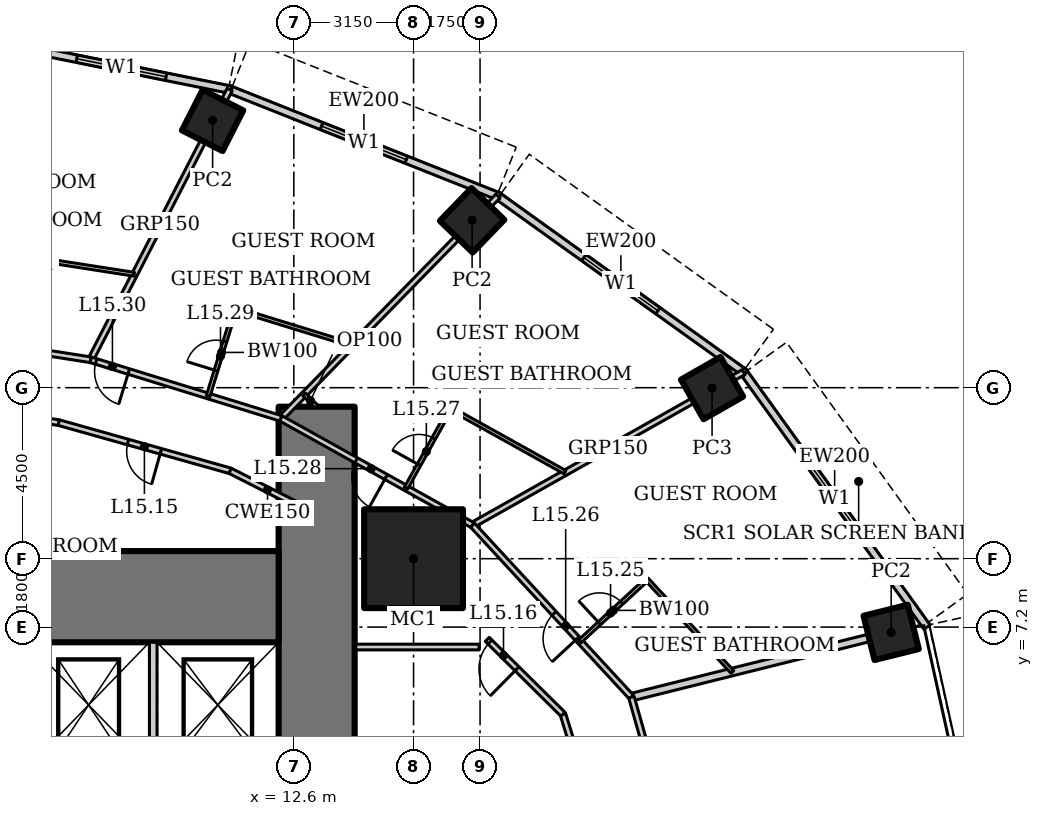
"""IFC4 building model, lengths in metres.
Left out: names, types, materials, properties, quantities, classifications, styles, units other than length and angle.
Written with IfcOpenShell. Run it as: python <this file> out.ifc"""

import sys

from ifc_helpers import new_model, si_unit, direction, frame, frame_2d, origin, origin_2d, place, context, subcontext, project, spatial, rectangle, hollow_rectangle, extrude, element, fill, save


model = new_model("IFC4")
c1 = context("Model", 3, precision=1e-05, world=origin(), true_north=direction((0.0, 1.0)))
c2 = subcontext(c1, "Body", "Model", "MODEL_VIEW")
j1 = project(units=[si_unit("LENGTHUNIT", "METRE"), si_unit("PLANEANGLEUNIT", "RADIAN")], contexts=[c1])
p1 = place(None, origin())
s1 = spatial("IfcSite", under=j1, at=p1, CompositionType="ELEMENT")
p2 = place(p1, origin())
s2 = spatial("IfcBuilding", under=s1, at=p2, CompositionType="ELEMENT")
p3 = place(p2, frame((0.0, 0.0, 69.4)))
s3 = spatial("IfcBuildingStorey", under=s2, at=p3, CompositionType="ELEMENT", Elevation=69.4)
p4 = place(p3, frame((15.75, 9.0, 0.0), z_axis=(0.0, 0.0, 1.0), x_axis=(1.0, 0.0, 0.0)))
e1 = element("IfcColumn", 1, at=p4, inside=s3, PredefinedType="COLUMN", context=c2, shape_type="SweptSolid", body=[
    extrude(hollow_rectangle(XDim=2.6, YDim=2.6, WallThickness=0.13, at=origin_2d()), origin(), (0.0, 0.0, 1.0), 3.6),
])
p5 = place(p3, frame((28.318, 7.06, 0.0), z_axis=(0.0, 0.0, 1.0), x_axis=(0.970295726276, 0.2419218956, 0.0)))
e2 = element("IfcColumn", 2, at=p5, inside=s3, PredefinedType="COLUMN", context=c2, shape_type="SweptSolid", body=[
    extrude(hollow_rectangle(XDim=1.2, YDim=1.2, WallThickness=0.1, at=origin_2d()), origin(), (0.0, 0.0, 1.0), 3.6),
])
p6 = place(p3, frame((23.605, 13.489, 0.0), z_axis=(0.0, 0.0, 1.0), x_axis=(0.86824298017, 0.496139221777, 0.0)))
e3 = element("IfcColumn", 3, at=p6, inside=s3, PredefinedType="COLUMN", context=c2, shape_type="SweptSolid", body=[
    extrude(hollow_rectangle(XDim=1.2, YDim=1.2, WallThickness=0.12, at=origin_2d()), origin(), (0.0, 0.0, 1.0), 3.6),
])
for number, where, z_axis, x_axis in (
    (4, (17.291, 17.905, 0.0), (0.0, 0.0, 1.0), (0.695, 0.719, 0.0)),
    (5, (10.463, 20.534, 0.0), (0.0, 0.0, 1.0), (0.454, 0.891, 0.0)),
):
    element("IfcColumn", number, at=place(p3, frame(where, z_axis=z_axis, x_axis=x_axis)), inside=s3, PredefinedType="COLUMN", context=c2, shape_type="SweptSolid", body=[
        extrude(hollow_rectangle(XDim=1.2, YDim=1.2, WallThickness=0.1, at=origin_2d()), origin(), (0.0, 0.0, 1.0), 3.6),
    ])
p7 = place(p3, frame((13.2, -13.0, 0.0), z_axis=(0.0, 0.0, 1.0), x_axis=(0.0, 1.0, 0.0)))
e6 = element("IfcWall", 6, at=p7, inside=s3, PredefinedType="SHEAR", context=c2, shape_type="SweptSolid", body=[
    extrude(rectangle(XDim=26.0, YDim=2.0, at=frame_2d((13.0, 0.0))), origin(), (0.0, 0.0, 1.0), 3.6),
])
p8 = place(p7, frame((12.1, 0.0, 0.0)))
e7 = element("IfcOpeningElement", 7, at=p8, cuts=e6, PredefinedType="OPENING", context=c2, shape_type="SweptSolid", body=[
    extrude(rectangle(XDim=1.8, YDim=2.1, at=frame_2d((0.9, 1.05))), frame((0.0, 1.01, 0.0), z_axis=(0.0, -1.0, 0.0), x_axis=(1.0, 0.0, 0.0)), (0.0, 0.0, 1.0), 2.02),
])
p9 = place(p3, frame((12.2, 8.0, 0.0), z_axis=(0.0, 0.0, 1.0), x_axis=(-1.0, 0.0, 0.0)))
e8 = element("IfcWall", 8, at=p9, inside=s3, PredefinedType="SHEAR", context=c2, shape_type="SweptSolid", body=[
    extrude(rectangle(XDim=24.4, YDim=2.4, at=frame_2d((12.2, 0.0))), origin(), (0.0, 0.0, 1.0), 3.6),
])
p10 = place(p3, frame((8.9, 3.5, 0.0), z_axis=(0.0, 0.0, 1.0), x_axis=(0.0, 1.0, 0.0)))
e9 = element("IfcWall", 9, at=p10, inside=s3, PredefinedType="SOLIDWALL", context=c2, shape_type="SweptSolid", body=[
    extrude(rectangle(XDim=3.3, YDim=0.2, at=frame_2d((1.65, 0.0))), origin(), (0.0, 0.0, 1.0), 3.6),
])
p11 = place(p3, frame((29.26, 7.2, 0.0), z_axis=(0.0, 0.0, 1.0), x_axis=(-0.583937613703, 0.811798536155, 0.0)))
e10 = element("IfcWall", 10, at=p11, inside=s3, PredefinedType="SOLIDWALL", context=c2, shape_type="SweptSolid", body=[
    extrude(rectangle(XDim=8.323, YDim=0.2, at=frame_2d((4.162, 0.0))), origin(), (0.0, 0.0, 1.0), 3.45),
])
p12 = place(p11, frame((2.961, 0.0, 0.5)))
e11 = element("IfcOpeningElement", 11, at=p12, cuts=e10, PredefinedType="OPENING", context=c2, shape_type="SweptSolid", body=[
    extrude(rectangle(XDim=2.4, YDim=2.2, at=frame_2d((1.2, 1.1))), frame((0.0, 0.11, 0.0), z_axis=(0.0, -1.0, 0.0), x_axis=(1.0, 0.0, 0.0)), (0.0, 0.0, 1.0), 0.22),
])
p13 = place(p3, frame((24.482, 13.875, 0.0), z_axis=(0.0, 0.0, 1.0), x_axis=(-0.812791321576, 0.582554948112, 0.0)))
e12 = element("IfcWall", 12, at=p13, inside=s3, PredefinedType="SOLIDWALL", context=c2, shape_type="SweptSolid", body=[
    extrude(rectangle(XDim=8.063, YDim=0.2, at=frame_2d((4.032, 0.0))), origin(), (0.0, 0.0, 1.0), 3.45),
])
p14 = place(p13, frame((2.832, 0.0, 0.5)))
e13 = element("IfcOpeningElement", 13, at=p14, cuts=e12, PredefinedType="OPENING", context=c2, shape_type="SweptSolid", body=[
    extrude(rectangle(XDim=2.4, YDim=2.2, at=frame_2d((1.2, 1.1))), frame((0.0, 0.11, 0.0), z_axis=(0.0, -1.0, 0.0), x_axis=(1.0, 0.0, 0.0)), (0.0, 0.0, 1.0), 0.22),
])
p15 = place(p3, frame((18.018, 18.523, 0.0), z_axis=(0.0, 0.0, 1.0), x_axis=(-0.929358351251, 0.369178892895, 0.0)))
e14 = element("IfcWall", 14, at=p15, inside=s3, PredefinedType="SOLIDWALL", context=c2, shape_type="SweptSolid", body=[
    extrude(rectangle(XDim=7.692, YDim=0.2, at=frame_2d((3.846, 0.0))), origin(), (0.0, 0.0, 1.0), 3.45),
])
p16 = place(p15, frame((2.646, 0.0, 0.5)))
e15 = element("IfcOpeningElement", 15, at=p16, cuts=e14, PredefinedType="OPENING", context=c2, shape_type="SweptSolid", body=[
    extrude(rectangle(XDim=2.4, YDim=2.2, at=frame_2d((1.2, 1.1))), frame((0.0, 0.11, 0.0), z_axis=(0.0, -1.0, 0.0), x_axis=(1.0, 0.0, 0.0)), (0.0, 0.0, 1.0), 0.22),
])
p17 = place(p3, frame((10.957, 21.337, 0.0), z_axis=(0.0, 0.0, 1.0), x_axis=(-0.980251657452, 0.197754110105, 0.0)))
e16 = element("IfcWall", 16, at=p17, inside=s3, PredefinedType="SOLIDWALL", context=c2, shape_type="SweptSolid", body=[
    extrude(rectangle(XDim=5.904, YDim=0.2, at=frame_2d((2.952, 0.0))), origin(), (0.0, 0.0, 1.0), 3.45),
])
p18 = place(p17, frame((1.752, 0.0, 0.5)))
e17 = element("IfcOpeningElement", 17, at=p18, cuts=e16, PredefinedType="OPENING", context=c2, shape_type="SweptSolid", body=[
    extrude(rectangle(XDim=2.4, YDim=2.2, at=frame_2d((1.2, 1.1))), frame((0.0, 0.11, 0.0), z_axis=(0.0, -1.0, 0.0), x_axis=(1.0, 0.0, 0.0)), (0.0, 0.0, 1.0), 0.22),
])
p19 = place(p3, frame((27.833, 6.939, 0.0), z_axis=(0.0, 0.0, 1.0), x_axis=(-0.970295936837, -0.241921051083, 0.0)))
e18 = element("IfcWall", 18, at=p19, inside=s3, PredefinedType="SOLIDWALL", context=c2, shape_type="SweptSolid", body=[
    extrude(rectangle(XDim=6.543, YDim=0.2, at=frame_2d((3.272, 0.0))), origin(), (0.0, 0.0, 1.0), 2.333),
])
p20 = place(p3, frame((24.435, 13.909, 0.0), z_axis=(0.0, 0.0, 1.0), x_axis=(-0.871075246657, -0.491149584813, 0.0)))
e19 = element("IfcWall", 19, at=p20, inside=s3, PredefinedType="PARTITIONING", context=c2, shape_type="SweptSolid", body=[
    extrude(rectangle(XDim=8.192, YDim=0.15, at=frame_2d((4.096, 0.0))), origin(), (0.0, 0.0, 1.0), 2.693),
])
p21 = place(p3, frame((17.97, 18.542, 0.0), z_axis=(0.0, 0.0, 1.0), x_axis=(-0.698757291878, -0.715358823981, 0.0)))
e20 = element("IfcWall", 20, at=p21, inside=s3, PredefinedType="PARTITIONING", context=c2, shape_type="SweptSolid", body=[
    extrude(rectangle(XDim=8.177, YDim=0.15, at=frame_2d((4.088, 0.0))), origin(), (0.0, 0.0, 1.0), 2.528),
])
p22 = place(p3, frame((10.912, 21.346, 0.0), z_axis=(0.0, 0.0, 1.0), x_axis=(-0.45752665959, -0.889195904042, 0.0)))
e21 = element("IfcWall", 21, at=p22, inside=s3, PredefinedType="PARTITIONING", context=c2, shape_type="SweptSolid", body=[
    extrude(rectangle(XDim=7.997, YDim=0.15, at=frame_2d((3.999, 0.0))), origin(), (0.0, 0.0, 1.0), 2.528),
])
p23 = place(p3, frame((21.484, 5.356, 0.0), z_axis=(0.0, 0.0, 1.0), x_axis=(-0.678641806296, 0.734469399463, 0.0)))
e22 = element("IfcWall", 22, at=p23, inside=s3, PredefinedType="PARTITIONING", context=c2, shape_type="SweptSolid", body=[
    extrude(rectangle(XDim=6.166, YDim=0.15, at=frame_2d((3.083, 0.0))), origin(), (0.0, 0.0, 1.0), 3.45),
])
p24 = place(p23, frame((2.1, 0.0, 0.0)))
e23 = element("IfcOpeningElement", 23, at=p24, cuts=e22, PredefinedType="OPENING", context=c2, shape_type="SweptSolid", body=[
    extrude(rectangle(XDim=0.9, YDim=2.1, at=frame_2d((0.45, 1.05))), frame((0.0, 0.085, 0.0), z_axis=(0.0, -1.0, 0.0), x_axis=(1.0, 0.0, 0.0)), (0.0, 0.0, 1.0), 0.17),
])
p25 = place(p3, frame((17.299, 9.885, 0.0), z_axis=(0.0, 0.0, 1.0), x_axis=(-0.873695910579, 0.486472461541, 0.0)))
e24 = element("IfcWall", 24, at=p25, inside=s3, PredefinedType="PARTITIONING", context=c2, shape_type="SweptSolid", body=[
    extrude(rectangle(XDim=5.771, YDim=0.15, at=frame_2d((2.885, 0.0))), origin(), (0.0, 0.0, 1.0), 3.45),
])
p26 = place(p25, frame((2.6, 0.0, 0.0)))
e25 = element("IfcOpeningElement", 25, at=p26, cuts=e24, PredefinedType="OPENING", context=c2, shape_type="SweptSolid", body=[
    extrude(rectangle(XDim=0.9, YDim=2.1, at=frame_2d((0.45, 1.05))), frame((0.0, 0.085, 0.0), z_axis=(0.0, -1.0, 0.0), x_axis=(1.0, 0.0, 0.0)), (0.0, 0.0, 1.0), 0.17),
])
p27 = place(p3, frame((12.257, 12.693, 0.0), z_axis=(0.0, 0.0, 1.0), x_axis=(-0.955657956744, 0.294478980085, 0.0)))
e26 = element("IfcWall", 26, at=p27, inside=s3, PredefinedType="PARTITIONING", context=c2, shape_type="SweptSolid", body=[
    extrude(rectangle(XDim=5.236, YDim=0.15, at=frame_2d((2.618, 0.0))), origin(), (0.0, 0.0, 1.0), 3.45),
])
p28 = place(p27, frame((4.186, 0.0, 0.0)))
e27 = element("IfcOpeningElement", 27, at=p28, cuts=e26, PredefinedType="OPENING", context=c2, shape_type="SweptSolid", body=[
    extrude(rectangle(XDim=0.9, YDim=2.1, at=frame_2d((0.45, 1.05))), frame((0.0, 0.085, 0.0), z_axis=(0.0, -1.0, 0.0), x_axis=(1.0, 0.0, 0.0)), (0.0, 0.0, 1.0), 0.17),
])
p29 = place(p3, frame((7.253, 14.235, 0.0), z_axis=(0.0, 0.0, 1.0), x_axis=(-0.988015036573, 0.154357660987, 0.0)))
e28 = element("IfcWall", 28, at=p29, inside=s3, PredefinedType="PARTITIONING", context=c2, shape_type="SweptSolid", body=[
    extrude(rectangle(XDim=3.875, YDim=0.15, at=frame_2d((1.938, 0.0))), origin(), (0.0, 0.0, 1.0), 3.45),
])
p30 = place(p29, frame((2.1, 0.0, 0.0)))
e29 = element("IfcOpeningElement", 29, at=p30, cuts=e28, PredefinedType="OPENING", context=c2, shape_type="SweptSolid", body=[
    extrude(rectangle(XDim=0.9, YDim=2.1, at=frame_2d((0.45, 1.05))), frame((0.0, 0.085, 0.0), z_axis=(0.0, -1.0, 0.0), x_axis=(1.0, 0.0, 0.0)), (0.0, 0.0, 1.0), 0.17),
])
p31 = place(p3, frame((20.921, 0.9, 0.0), z_axis=(0.0, 0.0, 1.0), x_axis=(-0.295778570807, 0.955256529447, 0.0)))
e30 = element("IfcWall", 30, at=p31, inside=s3, PredefinedType="PARTITIONING", context=c2, shape_type="SweptSolid", body=[
    extrude(rectangle(XDim=4.195, YDim=0.15, at=frame_2d((2.097, 0.0))), origin(), (0.0, 0.0, 1.0), 3.45),
])
p32 = place(p3, frame((10.924, 11.312, 0.0), z_axis=(0.0, 0.0, 1.0), x_axis=(-0.962643729928, 0.270771211967, 0.0)))
e31 = element("IfcWall", 31, at=p32, inside=s3, PredefinedType="PARTITIONING", context=c2, shape_type="SweptSolid", body=[
    extrude(rectangle(XDim=4.688, YDim=0.15, at=frame_2d((2.344, 0.0))), origin(), (0.0, 0.0, 1.0), 3.45),
])
p33 = place(p32, frame((1.894, 0.0, 0.0)))
e32 = element("IfcOpeningElement", 32, at=p33, cuts=e31, PredefinedType="OPENING", context=c2, shape_type="SweptSolid", body=[
    extrude(rectangle(XDim=0.9, YDim=2.1, at=frame_2d((0.45, 1.05))), frame((0.0, 0.085, 0.0), z_axis=(0.0, -1.0, 0.0), x_axis=(1.0, 0.0, 0.0)), (0.0, 0.0, 1.0), 0.17),
])
p34 = place(p3, frame((6.411, 12.582, 0.0), z_axis=(0.0, 0.0, 1.0), x_axis=(-0.990002114939, 0.14105251652, 0.0)))
e33 = element("IfcWall", 33, at=p34, inside=s3, PredefinedType="PARTITIONING", context=c2, shape_type="SweptSolid", body=[
    extrude(rectangle(XDim=3.429, YDim=0.15, at=frame_2d((1.714, 0.0))), origin(), (0.0, 0.0, 1.0), 3.45),
])
p35 = place(p3, frame((20.126, 6.825, 0.0), z_axis=(0.0, 0.0, 1.0), x_axis=(0.73447964986, 0.678630712495, 0.0)))
e34 = element("IfcWall", 34, at=p35, inside=s3, PredefinedType="PARTITIONING", context=c2, shape_type="SweptSolid", body=[
    extrude(rectangle(XDim=2.4, YDim=0.1, at=frame_2d((1.2, 0.0))), origin(), (0.0, 0.0, 1.0), 3.45),
])
p36 = place(p35, frame((0.7, 0.0, 0.0)))
e35 = element("IfcOpeningElement", 35, at=p36, cuts=e34, PredefinedType="OPENING", context=c2, shape_type="SweptSolid", body=[
    extrude(rectangle(XDim=0.8, YDim=2.1, at=frame_2d((0.4, 1.05))), frame((0.0, 0.06, 0.0), z_axis=(0.0, -1.0, 0.0), x_axis=(1.0, 0.0, 0.0)), (0.0, 0.0, 1.0), 0.12),
])
p37 = place(p3, frame((21.889, 8.454, 0.0), z_axis=(0.0, 0.0, 1.0), x_axis=(0.678653067823, -0.734458993773, 0.0)))
e36 = element("IfcWall", 36, at=p37, inside=s3, PredefinedType="PARTITIONING", context=c2, shape_type="SweptSolid", body=[
    extrude(rectangle(XDim=3.316, YDim=0.1, at=frame_2d((1.658, 0.0))), origin(), (0.0, 0.0, 1.0), 3.45),
])
p38 = place(p3, frame((15.552, 10.858, 0.0), z_axis=(0.0, 0.0, 1.0), x_axis=(0.486445964861, 0.873710663361, 0.0)))
e37 = element("IfcWall", 37, at=p38, inside=s3, PredefinedType="PARTITIONING", context=c2, shape_type="SweptSolid", body=[
    extrude(rectangle(XDim=2.4, YDim=0.1, at=frame_2d((1.2, 0.0))), origin(), (0.0, 0.0, 1.0), 3.45),
])
p39 = place(p38, frame((0.7, 0.0, 0.0)))
e38 = element("IfcOpeningElement", 38, at=p39, cuts=e37, PredefinedType="OPENING", context=c2, shape_type="SweptSolid", body=[
    extrude(rectangle(XDim=0.8, YDim=2.1, at=frame_2d((0.4, 1.05))), frame((0.0, 0.06, 0.0), z_axis=(0.0, -1.0, 0.0), x_axis=(1.0, 0.0, 0.0)), (0.0, 0.0, 1.0), 0.12),
])
p40 = place(p3, frame((16.719, 12.955, 0.0), z_axis=(0.0, 0.0, 1.0), x_axis=(0.873676251648, -0.486507766953, 0.0)))
e39 = element("IfcWall", 39, at=p40, inside=s3, PredefinedType="PARTITIONING", context=c2, shape_type="SweptSolid", body=[
    extrude(rectangle(XDim=3.45, YDim=0.1, at=frame_2d((1.725, 0.0))), origin(), (0.0, 0.0, 1.0), 3.45),
])
p41 = place(p3, frame((10.346, 13.281, 0.0), z_axis=(0.0, 0.0, 1.0), x_axis=(0.294478957423, 0.955657963727, 0.0)))
e40 = element("IfcWall", 40, at=p41, inside=s3, PredefinedType="PARTITIONING", context=c2, shape_type="SweptSolid", body=[
    extrude(rectangle(XDim=2.4, YDim=0.1, at=frame_2d((1.2, 0.0))), origin(), (0.0, 0.0, 1.0), 3.45),
])
p42 = place(p41, frame((0.7, 0.0, 0.0)))
e41 = element("IfcOpeningElement", 41, at=p42, cuts=e40, PredefinedType="OPENING", context=c2, shape_type="SweptSolid", body=[
    extrude(rectangle(XDim=0.8, YDim=2.1, at=frame_2d((0.4, 1.05))), frame((0.0, 0.06, 0.0), z_axis=(0.0, -1.0, 0.0), x_axis=(1.0, 0.0, 0.0)), (0.0, 0.0, 1.0), 0.12),
])
p43 = place(p3, frame((11.052, 15.575, 0.0), z_axis=(0.0, 0.0, 1.0), x_axis=(0.955641033268, -0.294533895391, 0.0)))
e42 = element("IfcWall", 42, at=p43, inside=s3, PredefinedType="PARTITIONING", context=c2, shape_type="SweptSolid", body=[
    extrude(rectangle(XDim=3.216, YDim=0.1, at=frame_2d((1.608, 0.0))), origin(), (0.0, 0.0, 1.0), 3.45),
])
p44 = place(p3, frame((5.647, 16.915, 0.0), z_axis=(0.0, 0.0, 1.0), x_axis=(0.988015375833, -0.154355489429, 0.0)))
e43 = element("IfcWall", 43, at=p44, inside=s3, PredefinedType="PARTITIONING", context=c2, shape_type="SweptSolid", body=[
    extrude(rectangle(XDim=2.785, YDim=0.1, at=frame_2d((1.393, 0.0))), origin(), (0.0, 0.0, 1.0), 3.45),
])
p45 = place(p3, frame((23.0, 0.0, 0.0), z_axis=(0.0, 0.0, 1.0), x_axis=(-0.272386051236, 0.962188047677, 0.0)))
e44 = element("IfcWall", 44, at=p45, inside=s3, PredefinedType="ELEMENTEDWALL", context=c2, shape_type="SweptSolid", body=[
    extrude(rectangle(XDim=5.567, YDim=0.15, at=frame_2d((2.783, 0.0))), origin(), (0.0, 0.0, 1.0), 3.45),
])
p46 = place(p45, frame((1.884, 0.0, 0.0)))
e45 = element("IfcOpeningElement", 45, at=p46, cuts=e44, PredefinedType="OPENING", context=c2, shape_type="SweptSolid", body=[
    extrude(rectangle(XDim=1.8, YDim=2.1, at=frame_2d((0.9, 1.05))), frame((0.0, 0.085, 0.0), z_axis=(0.0, -1.0, 0.0), x_axis=(1.0, 0.0, 0.0)), (0.0, 0.0, 1.0), 0.17),
])
p47 = place(p3, frame((13.2, 13.0, 0.0), z_axis=(0.0, 0.0, 1.0), x_axis=(-0.715289751842, 0.698827998087, 0.0)))
e46 = element("IfcWall", 46, at=p47, inside=s3, PredefinedType="PARTITIONING", context=c2, shape_type="SweptSolid", body=[
    extrude(rectangle(XDim=0.46, YDim=0.1, at=frame_2d((0.23, 0.0))), origin(), (0.0, 0.0, 1.0), 3.45),
])
p48 = place(p3, frame((19.681, 4.907, 0.0), z_axis=(0.0, 0.0, 1.0), x_axis=(-0.710845937688, 0.70334774676, 0.0)))
e47 = element("IfcWall", 47, at=p48, inside=s3, PredefinedType="PARTITIONING", context=c2, shape_type="SweptSolid", body=[
    extrude(rectangle(XDim=2.8, YDim=0.15, at=frame_2d((1.4, 0.0))), origin(), (0.0, 0.0, 1.0), 3.45),
])
p49 = place(p48, frame((1.7, 0.0, 0.0)))
e48 = element("IfcOpeningElement", 48, at=p49, cuts=e47, PredefinedType="OPENING", context=c2, shape_type="SweptSolid", body=[
    extrude(rectangle(XDim=1.0, YDim=2.1, at=frame_2d((0.5, 1.05))), frame((0.0, 0.085, 0.0), z_axis=(0.0, -1.0, 0.0), x_axis=(1.0, 0.0, 0.0)), (0.0, 0.0, 1.0), 0.17),
])
p50 = place(p3, frame((12.89, 10.313, 0.0), z_axis=(0.0, 0.0, 1.0), x_axis=(-0.891372999417, 0.453270532805, 0.0)))
e49 = element("IfcWall", 49, at=p50, inside=s3, PredefinedType="PARTITIONING", context=c2, shape_type="SweptSolid", body=[
    extrude(rectangle(XDim=2.205, YDim=0.15, at=frame_2d((1.103, 0.0))), origin(), (0.0, 0.0, 1.0), 3.45),
])
p51 = place(p3, frame((17.475, 6.675, 0.0), z_axis=(0.0, 0.0, 1.0), x_axis=(-1.0, 0.0, 0.0)))
e50 = element("IfcWall", 50, at=p51, inside=s3, PredefinedType="PARTITIONING", context=c2, shape_type="SweptSolid", body=[
    extrude(rectangle(XDim=3.245, YDim=0.15, at=frame_2d((1.622, 0.0))), origin(), (0.0, 0.0, 1.0), 3.45),
])
p52 = place(p12, origin())
e51 = element("IfcWindow", 51, at=p52, inside=s3, PartitioningType="SINGLE_PANEL", PredefinedType="WINDOW", context=c2, shape_type="SweptSolid", body=[
    extrude(rectangle(XDim=2.4, YDim=2.2, at=frame_2d((1.2, 1.1))), frame((0.0, 0.03, 0.0), z_axis=(0.0, -1.0, 0.0), x_axis=(1.0, 0.0, 0.0)), (0.0, 0.0, 1.0), 0.06),
])
fill(e11, e51)
p53 = place(p14, origin())
e52 = element("IfcWindow", 52, at=p53, inside=s3, PartitioningType="SINGLE_PANEL", PredefinedType="WINDOW", context=c2, shape_type="SweptSolid", body=[
    extrude(rectangle(XDim=2.4, YDim=2.2, at=frame_2d((1.2, 1.1))), frame((0.0, 0.03, 0.0), z_axis=(0.0, -1.0, 0.0), x_axis=(1.0, 0.0, 0.0)), (0.0, 0.0, 1.0), 0.06),
])
fill(e13, e52)
p54 = place(p16, origin())
e53 = element("IfcWindow", 53, at=p54, inside=s3, PartitioningType="SINGLE_PANEL", PredefinedType="WINDOW", context=c2, shape_type="SweptSolid", body=[
    extrude(rectangle(XDim=2.4, YDim=2.2, at=frame_2d((1.2, 1.1))), frame((0.0, 0.03, 0.0), z_axis=(0.0, -1.0, 0.0), x_axis=(1.0, 0.0, 0.0)), (0.0, 0.0, 1.0), 0.06),
])
fill(e15, e53)
p55 = place(p18, origin())
e54 = element("IfcWindow", 54, at=p55, inside=s3, PartitioningType="SINGLE_PANEL", PredefinedType="WINDOW", context=c2, shape_type="SweptSolid", body=[
    extrude(rectangle(XDim=2.4, YDim=2.2, at=frame_2d((1.2, 1.1))), frame((0.0, 0.03, 0.0), z_axis=(0.0, -1.0, 0.0), x_axis=(1.0, 0.0, 0.0)), (0.0, 0.0, 1.0), 0.06),
])
fill(e17, e54)
p56 = place(p33, origin())
e55 = element("IfcDoor", 55, at=p56, inside=s3, OperationType="SINGLE_SWING_LEFT", PredefinedType="DOOR", context=c2, shape_type="SweptSolid", body=[
    extrude(rectangle(XDim=0.9, YDim=2.1, at=frame_2d((0.45, 1.05))), frame((0.0, 0.025, 0.0), z_axis=(0.0, -1.0, 0.0), x_axis=(1.0, 0.0, 0.0)), (0.0, 0.0, 1.0), 0.05),
])
fill(e32, e55)
p57 = place(p49, origin())
e56 = element("IfcDoor", 56, at=p57, inside=s3, OperationType="SINGLE_SWING_LEFT", PredefinedType="DOOR", context=c2, shape_type="SweptSolid", body=[
    extrude(rectangle(XDim=1.0, YDim=2.1, at=frame_2d((0.5, 1.05))), frame((0.0, 0.025, 0.0), z_axis=(0.0, -1.0, 0.0), x_axis=(1.0, 0.0, 0.0)), (0.0, 0.0, 1.0), 0.05),
])
fill(e48, e56)
p58 = place(p36, origin())
e57 = element("IfcDoor", 57, at=p58, inside=s3, OperationType="SINGLE_SWING_LEFT", PredefinedType="DOOR", context=c2, shape_type="SweptSolid", body=[
    extrude(rectangle(XDim=0.8, YDim=2.1, at=frame_2d((0.4, 1.05))), frame((0.0, 0.025, 0.0), z_axis=(0.0, -1.0, 0.0), x_axis=(1.0, 0.0, 0.0)), (0.0, 0.0, 1.0), 0.05),
])
fill(e35, e57)
p59 = place(p24, origin())
e58 = element("IfcDoor", 58, at=p59, inside=s3, OperationType="SINGLE_SWING_LEFT", PredefinedType="DOOR", context=c2, shape_type="SweptSolid", body=[
    extrude(rectangle(XDim=0.9, YDim=2.1, at=frame_2d((0.45, 1.05))), frame((0.0, 0.025, 0.0), z_axis=(0.0, -1.0, 0.0), x_axis=(1.0, 0.0, 0.0)), (0.0, 0.0, 1.0), 0.05),
])
fill(e23, e58)
p60 = place(p39, origin())
e59 = element("IfcDoor", 59, at=p60, inside=s3, OperationType="SINGLE_SWING_LEFT", PredefinedType="DOOR", context=c2, shape_type="SweptSolid", body=[
    extrude(rectangle(XDim=0.8, YDim=2.1, at=frame_2d((0.4, 1.05))), frame((0.0, 0.025, 0.0), z_axis=(0.0, -1.0, 0.0), x_axis=(1.0, 0.0, 0.0)), (0.0, 0.0, 1.0), 0.05),
])
fill(e38, e59)
p61 = place(p26, origin())
e60 = element("IfcDoor", 60, at=p61, inside=s3, OperationType="SINGLE_SWING_LEFT", PredefinedType="DOOR", context=c2, shape_type="SweptSolid", body=[
    extrude(rectangle(XDim=0.9, YDim=2.1, at=frame_2d((0.45, 1.05))), frame((0.0, 0.025, 0.0), z_axis=(0.0, -1.0, 0.0), x_axis=(1.0, 0.0, 0.0)), (0.0, 0.0, 1.0), 0.05),
])
fill(e25, e60)
p62 = place(p42, origin())
e61 = element("IfcDoor", 61, at=p62, inside=s3, OperationType="SINGLE_SWING_LEFT", PredefinedType="DOOR", context=c2, shape_type="SweptSolid", body=[
    extrude(rectangle(XDim=0.8, YDim=2.1, at=frame_2d((0.4, 1.05))), frame((0.0, 0.025, 0.0), z_axis=(0.0, -1.0, 0.0), x_axis=(1.0, 0.0, 0.0)), (0.0, 0.0, 1.0), 0.05),
])
fill(e41, e61)
p63 = place(p28, origin())
e62 = element("IfcDoor", 62, at=p63, inside=s3, OperationType="SINGLE_SWING_LEFT", PredefinedType="DOOR", context=c2, shape_type="SweptSolid", body=[
    extrude(rectangle(XDim=0.9, YDim=2.1, at=frame_2d((0.45, 1.05))), frame((0.0, 0.025, 0.0), z_axis=(0.0, -1.0, 0.0), x_axis=(1.0, 0.0, 0.0)), (0.0, 0.0, 1.0), 0.05),
])
fill(e27, e62)
save(model, sys.argv[1])
